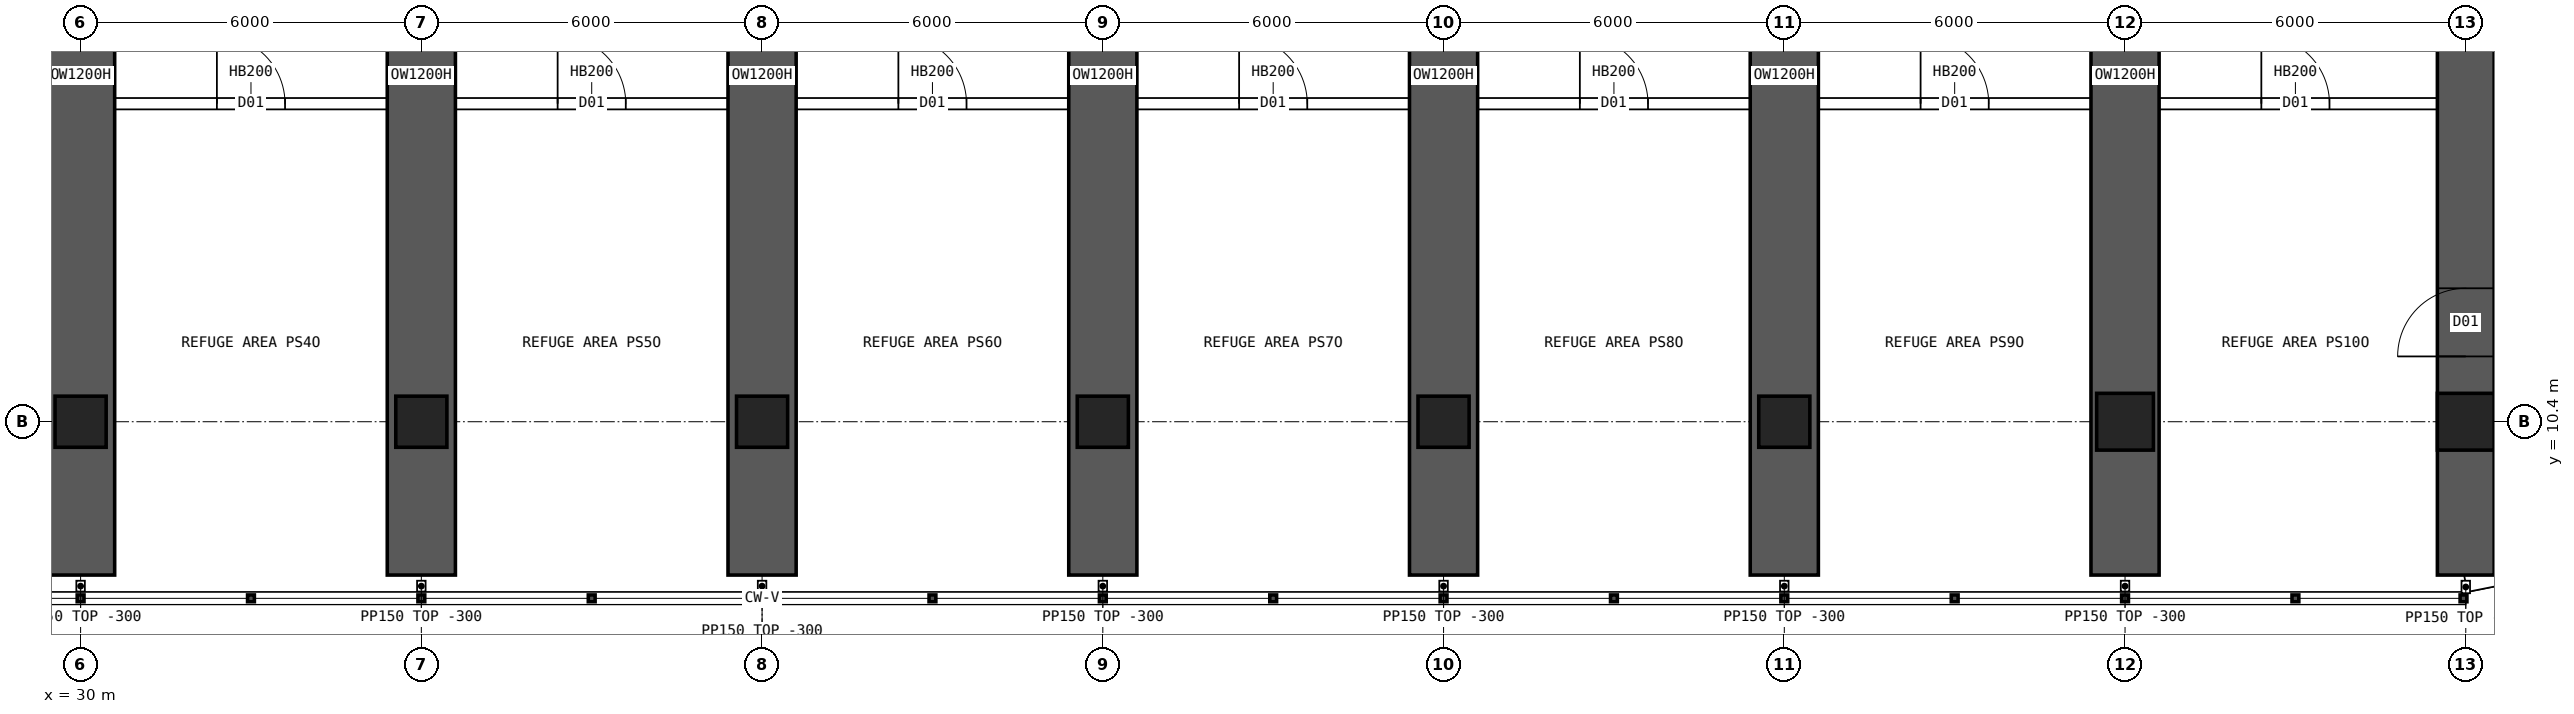
"""IFC4 building model, lengths in metres.
Left out: names, types, materials, properties, quantities, classifications, styles, units other than length and angle.
Written with IfcOpenShell. Run it as: python <this file> out.ifc"""

import sys

from ifc_helpers import new_model, si_unit, direction, frame, frame_2d, origin, origin_2d, place, context, subcontext, project, spatial, polyline, rectangle, hollow_rectangle, outline, extrude, element, fill, save


model = new_model("IFC4")
c1 = context("Model", 3, precision=1e-05, world=origin(), true_north=direction((0.0, 1.0)))
c2 = subcontext(c1, "Body", "Model", "MODEL_VIEW")
j1 = project(units=[si_unit("LENGTHUNIT", "METRE"), si_unit("PLANEANGLEUNIT", "RADIAN")], contexts=[c1])
p1 = place(None, origin())
s1 = spatial("IfcSite", under=j1, at=p1, CompositionType="ELEMENT")
p2 = place(p1, origin())
s2 = spatial("IfcBuilding", under=s1, at=p2, CompositionType="ELEMENT")
p3 = place(p2, frame((0.0, 0.0, 68.95)))
s3 = spatial("IfcBuildingStorey", under=s2, at=p3, CompositionType="ELEMENT", Elevation=68.95)
for number, where, z_axis, x_axis in (
    (1, (30.0, 10.4, 0.0), (0.0, 0.0, 1.0), (1.0, 0.0, 0.0)),
    (2, (36.0, 10.4, 0.0), (0.0, 0.0, 1.0), (1.0, 0.0, 0.0)),
    (3, (42.0, 10.4, 0.0), (0.0, 0.0, 1.0), (1.0, 0.0, 0.0)),
    (4, (48.0, 10.4, 0.0), (0.0, 0.0, 1.0), (1.0, 0.0, 0.0)),
    (5, (54.0, 10.4, 0.0), (0.0, 0.0, 1.0), (1.0, 0.0, 0.0)),
    (6, (60.0, 10.4, 0.0), (0.0, 0.0, 1.0), (1.0, 0.0, 0.0)),
):
    element("IfcColumn", number, at=place(p3, frame(where, z_axis=z_axis, x_axis=x_axis)), inside=s3, PredefinedType="COLUMN", context=c2, shape_type="SweptSolid", body=[
        extrude(hollow_rectangle(XDim=0.9, YDim=0.9, WallThickness=0.09, at=origin_2d()), origin(), (0.0, 0.0, 1.0), 7.2),
    ])
for number, where, z_axis, x_axis in (
    (7, (66.0, 10.4, 0.0), (0.0, 0.0, 1.0), (1.0, 0.0, 0.0)),
    (8, (72.0, 10.4, 0.0), (0.0, 0.0, 1.0), (1.0, 0.0, 0.0)),
):
    element("IfcColumn", number, at=place(p3, frame(where, z_axis=z_axis, x_axis=x_axis)), inside=s3, PredefinedType="COLUMN", context=c2, shape_type="SweptSolid", body=[
        extrude(hollow_rectangle(XDim=1.0, YDim=1.0, WallThickness=0.1, at=origin_2d()), origin(), (0.0, 0.0, 1.0), 7.2),
    ])
p4 = place(p3, frame((30.0, 7.7, 0.0), z_axis=(0.0, 0.0, 1.0), x_axis=(0.0, 1.0, 0.0)))
e9 = element("IfcWall", 9, at=p4, inside=s3, PredefinedType="SHEAR", context=c2, shape_type="SweptSolid", body=[
    extrude(rectangle(XDim=17.6, YDim=1.2, at=frame_2d((8.8, 0.0))), origin(), (0.0, 0.0, 1.0), 7.2),
])
p5 = place(p4, frame((16.0, 0.0, 0.0)))
e10 = element("IfcOpeningElement", 10, at=p5, cuts=e9, PredefinedType="OPENING", context=c2, shape_type="SweptSolid", body=[
    extrude(rectangle(XDim=1.2, YDim=2.1, at=frame_2d((0.6, 1.05))), frame((0.0, 0.61, 0.0), z_axis=(0.0, -1.0, 0.0), x_axis=(1.0, 0.0, 0.0)), (0.0, 0.0, 1.0), 1.22),
])
p6 = place(p3, frame((36.0, 7.7, 0.0), z_axis=(0.0, 0.0, 1.0), x_axis=(0.0, 1.0, 0.0)))
e11 = element("IfcWall", 11, at=p6, inside=s3, PredefinedType="SHEAR", context=c2, shape_type="SweptSolid", body=[
    extrude(rectangle(XDim=17.6, YDim=1.2, at=frame_2d((8.8, 0.0))), origin(), (0.0, 0.0, 1.0), 7.2),
])
p7 = place(p6, frame((16.0, 0.0, 0.0)))
e12 = element("IfcOpeningElement", 12, at=p7, cuts=e11, PredefinedType="OPENING", context=c2, shape_type="SweptSolid", body=[
    extrude(rectangle(XDim=1.2, YDim=2.1, at=frame_2d((0.6, 1.05))), frame((0.0, 0.61, 0.0), z_axis=(0.0, -1.0, 0.0), x_axis=(1.0, 0.0, 0.0)), (0.0, 0.0, 1.0), 1.22),
])
p8 = place(p3, frame((42.0, 7.7, 0.0), z_axis=(0.0, 0.0, 1.0), x_axis=(0.0, 1.0, 0.0)))
e13 = element("IfcWall", 13, at=p8, inside=s3, PredefinedType="SHEAR", context=c2, shape_type="SweptSolid", body=[
    extrude(rectangle(XDim=17.6, YDim=1.2, at=frame_2d((8.8, 0.0))), origin(), (0.0, 0.0, 1.0), 7.2),
])
p9 = place(p8, frame((16.0, 0.0, 0.0)))
e14 = element("IfcOpeningElement", 14, at=p9, cuts=e13, PredefinedType="OPENING", context=c2, shape_type="SweptSolid", body=[
    extrude(rectangle(XDim=1.2, YDim=2.1, at=frame_2d((0.6, 1.05))), frame((0.0, 0.61, 0.0), z_axis=(0.0, -1.0, 0.0), x_axis=(1.0, 0.0, 0.0)), (0.0, 0.0, 1.0), 1.22),
])
p10 = place(p3, frame((48.0, 7.7, 0.0), z_axis=(0.0, 0.0, 1.0), x_axis=(0.0, 1.0, 0.0)))
e15 = element("IfcWall", 15, at=p10, inside=s3, PredefinedType="SHEAR", context=c2, shape_type="SweptSolid", body=[
    extrude(rectangle(XDim=17.6, YDim=1.2, at=frame_2d((8.8, 0.0))), origin(), (0.0, 0.0, 1.0), 7.2),
])
p11 = place(p10, frame((16.0, 0.0, 0.0)))
e16 = element("IfcOpeningElement", 16, at=p11, cuts=e15, PredefinedType="OPENING", context=c2, shape_type="SweptSolid", body=[
    extrude(rectangle(XDim=1.2, YDim=2.1, at=frame_2d((0.6, 1.05))), frame((0.0, 0.61, 0.0), z_axis=(0.0, -1.0, 0.0), x_axis=(1.0, 0.0, 0.0)), (0.0, 0.0, 1.0), 1.22),
])
p12 = place(p3, frame((54.0, 7.7, 0.0), z_axis=(0.0, 0.0, 1.0), x_axis=(0.0, 1.0, 0.0)))
e17 = element("IfcWall", 17, at=p12, inside=s3, PredefinedType="SHEAR", context=c2, shape_type="SweptSolid", body=[
    extrude(rectangle(XDim=17.6, YDim=1.2, at=frame_2d((8.8, 0.0))), origin(), (0.0, 0.0, 1.0), 7.2),
])
p13 = place(p12, frame((16.0, 0.0, 0.0)))
e18 = element("IfcOpeningElement", 18, at=p13, cuts=e17, PredefinedType="OPENING", context=c2, shape_type="SweptSolid", body=[
    extrude(rectangle(XDim=1.2, YDim=2.1, at=frame_2d((0.6, 1.05))), frame((0.0, 0.61, 0.0), z_axis=(0.0, -1.0, 0.0), x_axis=(1.0, 0.0, 0.0)), (0.0, 0.0, 1.0), 1.22),
])
p14 = place(p3, frame((60.0, 7.7, 0.0), z_axis=(0.0, 0.0, 1.0), x_axis=(0.0, 1.0, 0.0)))
e19 = element("IfcWall", 19, at=p14, inside=s3, PredefinedType="SHEAR", context=c2, shape_type="SweptSolid", body=[
    extrude(rectangle(XDim=17.6, YDim=1.2, at=frame_2d((8.8, 0.0))), origin(), (0.0, 0.0, 1.0), 7.2),
])
p15 = place(p14, frame((16.0, 0.0, 0.0)))
e20 = element("IfcOpeningElement", 20, at=p15, cuts=e19, PredefinedType="OPENING", context=c2, shape_type="SweptSolid", body=[
    extrude(rectangle(XDim=1.2, YDim=2.1, at=frame_2d((0.6, 1.05))), frame((0.0, 0.61, 0.0), z_axis=(0.0, -1.0, 0.0), x_axis=(1.0, 0.0, 0.0)), (0.0, 0.0, 1.0), 1.22),
])
p16 = place(p3, frame((66.0, 7.7, 0.0), z_axis=(0.0, 0.0, 1.0), x_axis=(0.0, 1.0, 0.0)))
e21 = element("IfcWall", 21, at=p16, inside=s3, PredefinedType="SHEAR", context=c2, shape_type="SweptSolid", body=[
    extrude(rectangle(XDim=17.6, YDim=1.2, at=frame_2d((8.8, 0.0))), origin(), (0.0, 0.0, 1.0), 7.2),
])
p17 = place(p16, frame((16.0, 0.0, 0.0)))
e22 = element("IfcOpeningElement", 22, at=p17, cuts=e21, PredefinedType="OPENING", context=c2, shape_type="SweptSolid", body=[
    extrude(rectangle(XDim=1.2, YDim=2.1, at=frame_2d((0.6, 1.05))), frame((0.0, 0.61, 0.0), z_axis=(0.0, -1.0, 0.0), x_axis=(1.0, 0.0, 0.0)), (0.0, 0.0, 1.0), 1.22),
])
p18 = place(p3, frame((72.0, 7.7, 0.0), z_axis=(0.0, 0.0, 1.0), x_axis=(0.0, 1.0, 0.0)))
e23 = element("IfcWall", 23, at=p18, inside=s3, PredefinedType="SHEAR", context=c2, shape_type="SweptSolid", body=[
    extrude(rectangle(XDim=48.6, YDim=1.0, at=frame_2d((24.3, 0.0))), origin(), (0.0, 0.0, 1.0), 7.2),
])
p19 = place(p18, frame((3.85, 0.0, 0.0)))
e24 = element("IfcOpeningElement", 24, at=p19, cuts=e23, PredefinedType="OPENING", context=c2, shape_type="SweptSolid", body=[
    extrude(rectangle(XDim=1.2, YDim=2.1, at=frame_2d((0.6, 1.05))), frame((0.0, 0.51, 0.0), z_axis=(0.0, -1.0, 0.0), x_axis=(1.0, 0.0, 0.0)), (0.0, 0.0, 1.0), 1.02),
])
p20 = place(p18, frame((11.35, 0.0, 0.0)))
e25 = element("IfcOpeningElement", 25, at=p20, cuts=e23, PredefinedType="OPENING", context=c2, shape_type="SweptSolid", body=[
    extrude(rectangle(XDim=1.2, YDim=2.1, at=frame_2d((0.6, 1.05))), frame((0.0, 0.51, 0.0), z_axis=(0.0, -1.0, 0.0), x_axis=(1.0, 0.0, 0.0)), (0.0, 0.0, 1.0), 1.02),
])
p21 = place(p18, frame((43.55, 0.0, 0.0)))
e26 = element("IfcOpeningElement", 26, at=p21, cuts=e23, PredefinedType="OPENING", context=c2, shape_type="SweptSolid", body=[
    extrude(rectangle(XDim=1.2, YDim=2.1, at=frame_2d((0.6, 1.05))), frame((0.0, 0.51, 0.0), z_axis=(0.0, -1.0, 0.0), x_axis=(1.0, 0.0, 0.0)), (0.0, 0.0, 1.0), 1.02),
])
p22 = place(p18, frame((36.05, 0.0, 0.0)))
e27 = element("IfcOpeningElement", 27, at=p22, cuts=e23, PredefinedType="OPENING", context=c2, shape_type="SweptSolid", body=[
    extrude(rectangle(XDim=1.2, YDim=2.1, at=frame_2d((0.6, 1.05))), frame((0.0, 0.51, 0.0), z_axis=(0.0, -1.0, 0.0), x_axis=(1.0, 0.0, 0.0)), (0.0, 0.0, 1.0), 1.02),
])
p23 = place(p3, frame((72.0, 7.55, 0.0), z_axis=(0.0, 0.0, 1.0), x_axis=(0.980787251524, 0.195080412259, 0.0)))
e28 = element("IfcWall", 28, at=p23, inside=s3, PredefinedType="SOLIDWALL", context=c2, shape_type="SweptSolid", body=[
    extrude(outline(polyline([(-0.03, -0.15), (3.249, -0.15), (3.189, 0.15), (0.03, 0.15), (-0.03, -0.15)])), origin(), (0.0, 0.0, 1.0), 6.9),
])
p24 = place(p3, frame((30.5, 16.0, 0.0), z_axis=(0.0, 0.0, 1.0), x_axis=(1.0, 0.0, 0.0)))
e29 = element("IfcWall", 29, at=p24, inside=s3, PredefinedType="SOLIDWALL", context=c2, shape_type="SweptSolid", body=[
    extrude(rectangle(XDim=5.0, YDim=0.2, at=frame_2d((2.5, 0.0))), origin(), (0.0, 0.0, 1.0), 6.9),
])
p25 = place(p24, frame((1.9, 0.0, 0.0)))
e30 = element("IfcOpeningElement", 30, at=p25, cuts=e29, PredefinedType="OPENING", context=c2, shape_type="SweptSolid", body=[
    extrude(rectangle(XDim=1.2, YDim=2.1, at=frame_2d((0.6, 1.05))), frame((0.0, 0.11, 0.0), z_axis=(0.0, -1.0, 0.0), x_axis=(1.0, 0.0, 0.0)), (0.0, 0.0, 1.0), 0.22),
])
p26 = place(p3, frame((36.5, 16.0, 0.0), z_axis=(0.0, 0.0, 1.0), x_axis=(1.0, 0.0, 0.0)))
e31 = element("IfcWall", 31, at=p26, inside=s3, PredefinedType="SOLIDWALL", context=c2, shape_type="SweptSolid", body=[
    extrude(rectangle(XDim=5.0, YDim=0.2, at=frame_2d((2.5, 0.0))), origin(), (0.0, 0.0, 1.0), 6.9),
])
p27 = place(p26, frame((1.9, 0.0, 0.0)))
e32 = element("IfcOpeningElement", 32, at=p27, cuts=e31, PredefinedType="OPENING", context=c2, shape_type="SweptSolid", body=[
    extrude(rectangle(XDim=1.2, YDim=2.1, at=frame_2d((0.6, 1.05))), frame((0.0, 0.11, 0.0), z_axis=(0.0, -1.0, 0.0), x_axis=(1.0, 0.0, 0.0)), (0.0, 0.0, 1.0), 0.22),
])
p28 = place(p3, frame((42.5, 16.0, 0.0), z_axis=(0.0, 0.0, 1.0), x_axis=(1.0, 0.0, 0.0)))
e33 = element("IfcWall", 33, at=p28, inside=s3, PredefinedType="SOLIDWALL", context=c2, shape_type="SweptSolid", body=[
    extrude(rectangle(XDim=5.0, YDim=0.2, at=frame_2d((2.5, 0.0))), origin(), (0.0, 0.0, 1.0), 6.9),
])
p29 = place(p28, frame((1.9, 0.0, 0.0)))
e34 = element("IfcOpeningElement", 34, at=p29, cuts=e33, PredefinedType="OPENING", context=c2, shape_type="SweptSolid", body=[
    extrude(rectangle(XDim=1.2, YDim=2.1, at=frame_2d((0.6, 1.05))), frame((0.0, 0.11, 0.0), z_axis=(0.0, -1.0, 0.0), x_axis=(1.0, 0.0, 0.0)), (0.0, 0.0, 1.0), 0.22),
])
p30 = place(p3, frame((48.5, 16.0, 0.0), z_axis=(0.0, 0.0, 1.0), x_axis=(1.0, 0.0, 0.0)))
e35 = element("IfcWall", 35, at=p30, inside=s3, PredefinedType="SOLIDWALL", context=c2, shape_type="SweptSolid", body=[
    extrude(rectangle(XDim=5.0, YDim=0.2, at=frame_2d((2.5, 0.0))), origin(), (0.0, 0.0, 1.0), 6.9),
])
p31 = place(p30, frame((1.9, 0.0, 0.0)))
e36 = element("IfcOpeningElement", 36, at=p31, cuts=e35, PredefinedType="OPENING", context=c2, shape_type="SweptSolid", body=[
    extrude(rectangle(XDim=1.2, YDim=2.1, at=frame_2d((0.6, 1.05))), frame((0.0, 0.11, 0.0), z_axis=(0.0, -1.0, 0.0), x_axis=(1.0, 0.0, 0.0)), (0.0, 0.0, 1.0), 0.22),
])
p32 = place(p3, frame((54.5, 16.0, 0.0), z_axis=(0.0, 0.0, 1.0), x_axis=(1.0, 0.0, 0.0)))
e37 = element("IfcWall", 37, at=p32, inside=s3, PredefinedType="SOLIDWALL", context=c2, shape_type="SweptSolid", body=[
    extrude(rectangle(XDim=5.0, YDim=0.2, at=frame_2d((2.5, 0.0))), origin(), (0.0, 0.0, 1.0), 6.9),
])
p33 = place(p32, frame((1.9, 0.0, 0.0)))
e38 = element("IfcOpeningElement", 38, at=p33, cuts=e37, PredefinedType="OPENING", context=c2, shape_type="SweptSolid", body=[
    extrude(rectangle(XDim=1.2, YDim=2.1, at=frame_2d((0.6, 1.05))), frame((0.0, 0.11, 0.0), z_axis=(0.0, -1.0, 0.0), x_axis=(1.0, 0.0, 0.0)), (0.0, 0.0, 1.0), 0.22),
])
p34 = place(p3, frame((60.5, 16.0, 0.0), z_axis=(0.0, 0.0, 1.0), x_axis=(1.0, 0.0, 0.0)))
e39 = element("IfcWall", 39, at=p34, inside=s3, PredefinedType="SOLIDWALL", context=c2, shape_type="SweptSolid", body=[
    extrude(rectangle(XDim=5.0, YDim=0.2, at=frame_2d((2.5, 0.0))), origin(), (0.0, 0.0, 1.0), 6.9),
])
p35 = place(p34, frame((1.9, 0.0, 0.0)))
e40 = element("IfcOpeningElement", 40, at=p35, cuts=e39, PredefinedType="OPENING", context=c2, shape_type="SweptSolid", body=[
    extrude(rectangle(XDim=1.2, YDim=2.1, at=frame_2d((0.6, 1.05))), frame((0.0, 0.11, 0.0), z_axis=(0.0, -1.0, 0.0), x_axis=(1.0, 0.0, 0.0)), (0.0, 0.0, 1.0), 0.22),
])
p36 = place(p3, frame((66.5, 16.0, 0.0), z_axis=(0.0, 0.0, 1.0), x_axis=(1.0, 0.0, 0.0)))
e41 = element("IfcWall", 41, at=p36, inside=s3, PredefinedType="SOLIDWALL", context=c2, shape_type="SweptSolid", body=[
    extrude(rectangle(XDim=5.0, YDim=0.2, at=frame_2d((2.5, 0.0))), origin(), (0.0, 0.0, 1.0), 6.9),
])
p37 = place(p36, frame((1.9, 0.0, 0.0)))
e42 = element("IfcOpeningElement", 42, at=p37, cuts=e41, PredefinedType="OPENING", context=c2, shape_type="SweptSolid", body=[
    extrude(rectangle(XDim=1.2, YDim=2.1, at=frame_2d((0.6, 1.05))), frame((0.0, 0.11, 0.0), z_axis=(0.0, -1.0, 0.0), x_axis=(1.0, 0.0, 0.0)), (0.0, 0.0, 1.0), 0.22),
])
for number, where, z_axis, x_axis in (
    (43, (30.0, 7.6, 0.0), (0.0, 0.0, 1.0), (0.0, -1.0, 0.0)),
    (44, (36.0, 7.6, 0.0), (0.0, 0.0, 1.0), (0.0, -1.0, 0.0)),
    (45, (42.0, 7.6, 0.0), (0.0, 0.0, 1.0), (0.0, -1.0, 0.0)),
    (46, (48.0, 7.6, 0.0), (0.0, 0.0, 1.0), (0.0, -1.0, 0.0)),
    (47, (54.0, 7.6, 0.0), (0.0, 0.0, 1.0), (0.0, -1.0, 0.0)),
    (48, (60.0, 7.6, 0.0), (0.0, 0.0, 1.0), (0.0, -1.0, 0.0)),
    (49, (66.0, 7.6, 0.0), (0.0, 0.0, 1.0), (0.0, -1.0, 0.0)),
):
    element("IfcWall", number, at=place(p3, frame(where, z_axis=z_axis, x_axis=x_axis)), inside=s3, PredefinedType="PARTITIONING", context=c2, shape_type="SweptSolid", body=[
        extrude(rectangle(XDim=0.19, YDim=0.15, at=frame_2d((0.095, 0.0))), origin(), (0.0, 0.0, 1.0), 6.9),
    ])
p38 = place(p3, frame((72.0, 7.6, 0.0), z_axis=(0.0, 0.0, 1.0), x_axis=(0.0, -1.0, 0.0)))
e50 = element("IfcWall", 50, at=p38, inside=s3, PredefinedType="PARTITIONING", context=c2, shape_type="SweptSolid", body=[
    extrude(rectangle(XDim=0.22, YDim=0.15, at=frame_2d((0.11, 0.0))), origin(), (0.0, 0.0, 1.0), 6.9),
])
p39 = place(p25, origin())
e51 = element("IfcDoor", 51, at=p39, inside=s3, OperationType="SINGLE_SWING_LEFT", PredefinedType="DOOR", context=c2, shape_type="SweptSolid", body=[
    extrude(rectangle(XDim=1.2, YDim=2.1, at=frame_2d((0.6, 1.05))), frame((0.0, 0.025, 0.0), z_axis=(0.0, -1.0, 0.0), x_axis=(1.0, 0.0, 0.0)), (0.0, 0.0, 1.0), 0.05),
])
fill(e30, e51)
p40 = place(p27, origin())
e52 = element("IfcDoor", 52, at=p40, inside=s3, OperationType="SINGLE_SWING_LEFT", PredefinedType="DOOR", context=c2, shape_type="SweptSolid", body=[
    extrude(rectangle(XDim=1.2, YDim=2.1, at=frame_2d((0.6, 1.05))), frame((0.0, 0.025, 0.0), z_axis=(0.0, -1.0, 0.0), x_axis=(1.0, 0.0, 0.0)), (0.0, 0.0, 1.0), 0.05),
])
fill(e32, e52)
p41 = place(p29, origin())
e53 = element("IfcDoor", 53, at=p41, inside=s3, OperationType="SINGLE_SWING_LEFT", PredefinedType="DOOR", context=c2, shape_type="SweptSolid", body=[
    extrude(rectangle(XDim=1.2, YDim=2.1, at=frame_2d((0.6, 1.05))), frame((0.0, 0.025, 0.0), z_axis=(0.0, -1.0, 0.0), x_axis=(1.0, 0.0, 0.0)), (0.0, 0.0, 1.0), 0.05),
])
fill(e34, e53)
p42 = place(p31, origin())
e54 = element("IfcDoor", 54, at=p42, inside=s3, OperationType="SINGLE_SWING_LEFT", PredefinedType="DOOR", context=c2, shape_type="SweptSolid", body=[
    extrude(rectangle(XDim=1.2, YDim=2.1, at=frame_2d((0.6, 1.05))), frame((0.0, 0.025, 0.0), z_axis=(0.0, -1.0, 0.0), x_axis=(1.0, 0.0, 0.0)), (0.0, 0.0, 1.0), 0.05),
])
fill(e36, e54)
p43 = place(p33, origin())
e55 = element("IfcDoor", 55, at=p43, inside=s3, OperationType="SINGLE_SWING_LEFT", PredefinedType="DOOR", context=c2, shape_type="SweptSolid", body=[
    extrude(rectangle(XDim=1.2, YDim=2.1, at=frame_2d((0.6, 1.05))), frame((0.0, 0.025, 0.0), z_axis=(0.0, -1.0, 0.0), x_axis=(1.0, 0.0, 0.0)), (0.0, 0.0, 1.0), 0.05),
])
fill(e38, e55)
p44 = place(p35, origin())
e56 = element("IfcDoor", 56, at=p44, inside=s3, OperationType="SINGLE_SWING_LEFT", PredefinedType="DOOR", context=c2, shape_type="SweptSolid", body=[
    extrude(rectangle(XDim=1.2, YDim=2.1, at=frame_2d((0.6, 1.05))), frame((0.0, 0.025, 0.0), z_axis=(0.0, -1.0, 0.0), x_axis=(1.0, 0.0, 0.0)), (0.0, 0.0, 1.0), 0.05),
])
fill(e40, e56)
p45 = place(p37, origin())
e57 = element("IfcDoor", 57, at=p45, inside=s3, OperationType="SINGLE_SWING_LEFT", PredefinedType="DOOR", context=c2, shape_type="SweptSolid", body=[
    extrude(rectangle(XDim=1.2, YDim=2.1, at=frame_2d((0.6, 1.05))), frame((0.0, 0.025, 0.0), z_axis=(0.0, -1.0, 0.0), x_axis=(1.0, 0.0, 0.0)), (0.0, 0.0, 1.0), 0.05),
])
fill(e42, e57)
p46 = place(p19, origin())
e58 = element("IfcDoor", 58, at=p46, inside=s3, OperationType="SINGLE_SWING_LEFT", PredefinedType="DOOR", context=c2, shape_type="SweptSolid", body=[
    extrude(rectangle(XDim=1.2, YDim=2.1, at=frame_2d((0.6, 1.05))), frame((0.0, -0.435, 0.0), z_axis=(0.0, -1.0, 0.0), x_axis=(1.0, 0.0, 0.0)), (0.0, 0.0, 1.0), 0.05),
])
fill(e24, e58)
save(model, sys.argv[1])
